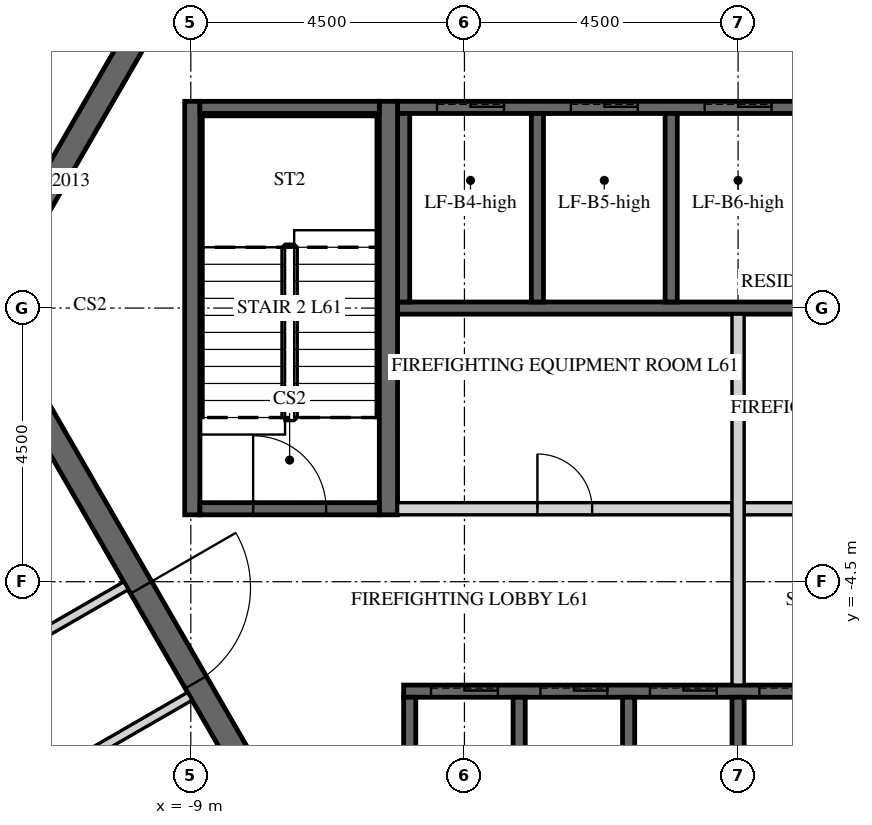
"""IFC4 building model, lengths in metres.
Left out: names, types, materials, properties, quantities, classifications, styles, units other than length and angle.
Written with IfcOpenShell. Run it as: python <this file> out.ifc"""

import sys

from ifc_helpers import new_model, si_unit, direction, frame, frame_2d, origin, place, context, subcontext, project, spatial, polyline, rectangle, outline, extrude, element, fill, save


model = new_model("IFC4")
c1 = context("Model", 3, precision=1e-05, world=origin(), true_north=direction((0.0, 1.0)))
c2 = subcontext(c1, "Body", "Model", "MODEL_VIEW")
j1 = project(units=[si_unit("LENGTHUNIT", "METRE"), si_unit("PLANEANGLEUNIT", "RADIAN")], contexts=[c1])
p1 = place(None, origin())
s1 = spatial("IfcSite", under=j1, at=p1, CompositionType="ELEMENT")
p2 = place(p1, origin())
s2 = spatial("IfcBuilding", under=s1, at=p2, CompositionType="ELEMENT")
p3 = place(p2, frame((0.0, 0.0, 256.2)))
s3 = spatial("IfcBuildingStorey", under=s2, at=p3, CompositionType="ELEMENT", Elevation=256.2)
p4 = place(p3, frame((-6.235, 10.8, 0.0), z_axis=(0.0, 0.0, 1.0), x_axis=(-0.499996419489, -0.866027470984, 0.0)))
e1 = element("IfcWall", 1, at=p4, inside=s3, PredefinedType="SHEAR", context=c2, shape_type="SweptSolid", body=[
    extrude(outline(polyline([(-0.115, -0.2), (12.586, -0.2), (12.355, 0.2), (0.115, 0.2), (-0.115, -0.2)])), origin(), (0.0, 0.0, 1.0), 3.75),
])
p5 = place(p4, frame((5.364, 0.0, 0.0)))
e2 = element("IfcOpeningElement", 2, at=p5, cuts=e1, PredefinedType="OPENING", context=c2, shape_type="SweptSolid", body=[
    extrude(rectangle(XDim=1.8, YDim=2.4, at=frame_2d((0.9, 1.2))), frame((0.0, 0.21, 0.0), z_axis=(0.0, -1.0, 0.0), x_axis=(1.0, 0.0, 0.0)), (0.0, 0.0, 1.0), 0.42),
])
p6 = place(p3, frame((-12.471, 0.0, 0.0), z_axis=(0.0, 0.0, 1.0), x_axis=(0.499996419489, -0.866027470984, 0.0)))
e3 = element("IfcWall", 3, at=p6, inside=s3, PredefinedType="SHEAR", context=c2, shape_type="SweptSolid", body=[
    extrude(outline(polyline([(-0.115, -0.2), (12.586, -0.2), (12.355, 0.2), (0.115, 0.2), (-0.115, -0.2)])), origin(), (0.0, 0.0, 1.0), 3.75),
])
p7 = place(p6, frame((5.306, 0.0, 0.0)))
e4 = element("IfcOpeningElement", 4, at=p7, cuts=e3, PredefinedType="OPENING", context=c2, shape_type="SweptSolid", body=[
    extrude(rectangle(XDim=1.8, YDim=2.4, at=frame_2d((0.9, 1.2))), frame((0.0, 0.21, 0.0), z_axis=(0.0, -1.0, 0.0), x_axis=(1.0, 0.0, 0.0)), (0.0, 0.0, 1.0), 0.42),
])
p8 = place(p3, frame((-5.6, 3.3, -0.5), z_axis=(0.0, 0.0, 1.0), x_axis=(1.0, 0.0, 0.0)))
e5 = element("IfcWall", 5, at=p8, inside=s3, PredefinedType="SHEAR", context=c2, shape_type="SweptSolid", body=[
    extrude(rectangle(XDim=6.6, YDim=0.2, at=frame_2d((3.3, 0.0))), origin(), (0.0, 0.0, 1.0), 4.15),
])
p9 = place(p8, frame((0.65, 0.0, 0.5)))
e6 = element("IfcOpeningElement", 6, at=p9, cuts=e5, PredefinedType="OPENING", context=c2, shape_type="SweptSolid", body=[
    extrude(rectangle(XDim=1.1, YDim=2.1, at=frame_2d((0.55, 1.05))), frame((0.0, 0.11, 0.0), z_axis=(0.0, -1.0, 0.0), x_axis=(1.0, 0.0, 0.0)), (0.0, 0.0, 1.0), 0.22),
])
p10 = place(p8, frame((2.85, 0.0, 0.5)))
e7 = element("IfcOpeningElement", 7, at=p10, cuts=e5, PredefinedType="OPENING", context=c2, shape_type="SweptSolid", body=[
    extrude(rectangle(XDim=1.1, YDim=2.1, at=frame_2d((0.55, 1.05))), frame((0.0, 0.11, 0.0), z_axis=(0.0, -1.0, 0.0), x_axis=(1.0, 0.0, 0.0)), (0.0, 0.0, 1.0), 0.22),
])
p11 = place(p8, frame((5.05, 0.0, 0.5)))
e8 = element("IfcOpeningElement", 8, at=p11, cuts=e5, PredefinedType="OPENING", context=c2, shape_type="SweptSolid", body=[
    extrude(rectangle(XDim=1.1, YDim=2.1, at=frame_2d((0.55, 1.05))), frame((0.0, 0.11, 0.0), z_axis=(0.0, -1.0, 0.0), x_axis=(1.0, 0.0, 0.0)), (0.0, 0.0, 1.0), 0.22),
])
p12 = place(p3, frame((-5.6, 0.0, -0.5), z_axis=(0.0, 0.0, 1.0), x_axis=(1.0, 0.0, 0.0)))
e9 = element("IfcWall", 9, at=p12, inside=s3, PredefinedType="SHEAR", context=c2, shape_type="SweptSolid", body=[
    extrude(rectangle(XDim=11.2, YDim=0.2, at=frame_2d((5.6, 0.0))), origin(), (0.0, 0.0, 1.0), 4.15),
])
for number, where, z_axis, x_axis in (
    (10, (-5.5, 0.1, -0.5), (0.0, 0.0, 1.0), (0.0, 1.0, 0.0)),
    (11, (-3.3, 0.1, -0.5), (0.0, 0.0, 1.0), (0.0, 1.0, 0.0)),
    (12, (-1.1, 0.1, -0.5), (0.0, 0.0, 1.0), (0.0, 1.0, 0.0)),
):
    element("IfcWall", number, at=place(p3, frame(where, z_axis=z_axis, x_axis=x_axis)), inside=s3, PredefinedType="SHEAR", context=c2, shape_type="SweptSolid", body=[
        extrude(rectangle(XDim=3.1, YDim=0.2, at=frame_2d((1.55, 0.0))), origin(), (0.0, 0.0, 1.0), 4.15),
    ])
p13 = place(p3, frame((-5.5, -6.3, -0.5), z_axis=(0.0, 0.0, 1.0), x_axis=(1.0, 0.0, 0.0)))
e13 = element("IfcWall", 13, at=p13, inside=s3, PredefinedType="SHEAR", context=c2, shape_type="SweptSolid", body=[
    extrude(rectangle(XDim=9.2, YDim=0.2, at=frame_2d((4.6, 0.0))), origin(), (0.0, 0.0, 1.0), 4.15),
])
p14 = place(p13, frame((0.45, 0.0, 0.5)))
e14 = element("IfcOpeningElement", 14, at=p14, cuts=e13, PredefinedType="OPENING", context=c2, shape_type="SweptSolid", body=[
    extrude(rectangle(XDim=1.1, YDim=2.1, at=frame_2d((0.55, 1.05))), frame((0.0, 0.11, 0.0), z_axis=(0.0, -1.0, 0.0), x_axis=(1.0, 0.0, 0.0)), (0.0, 0.0, 1.0), 0.22),
])
p15 = place(p13, frame((2.25, 0.0, 0.5)))
e15 = element("IfcOpeningElement", 15, at=p15, cuts=e13, PredefinedType="OPENING", context=c2, shape_type="SweptSolid", body=[
    extrude(rectangle(XDim=1.1, YDim=2.1, at=frame_2d((0.55, 1.05))), frame((0.0, 0.11, 0.0), z_axis=(0.0, -1.0, 0.0), x_axis=(1.0, 0.0, 0.0)), (0.0, 0.0, 1.0), 0.22),
])
p16 = place(p13, frame((4.05, 0.0, 0.5)))
e16 = element("IfcOpeningElement", 16, at=p16, cuts=e13, PredefinedType="OPENING", context=c2, shape_type="SweptSolid", body=[
    extrude(rectangle(XDim=1.1, YDim=2.1, at=frame_2d((0.55, 1.05))), frame((0.0, 0.11, 0.0), z_axis=(0.0, -1.0, 0.0), x_axis=(1.0, 0.0, 0.0)), (0.0, 0.0, 1.0), 0.22),
])
p17 = place(p13, frame((5.85, 0.0, 0.5)))
e17 = element("IfcOpeningElement", 17, at=p17, cuts=e13, PredefinedType="OPENING", context=c2, shape_type="SweptSolid", body=[
    extrude(rectangle(XDim=1.1, YDim=2.1, at=frame_2d((0.55, 1.05))), frame((0.0, 0.11, 0.0), z_axis=(0.0, -1.0, 0.0), x_axis=(1.0, 0.0, 0.0)), (0.0, 0.0, 1.0), 0.22),
])
p18 = place(p13, frame((7.65, 0.0, 0.5)))
e18 = element("IfcOpeningElement", 18, at=p18, cuts=e13, PredefinedType="OPENING", context=c2, shape_type="SweptSolid", body=[
    extrude(rectangle(XDim=1.1, YDim=2.1, at=frame_2d((0.55, 1.05))), frame((0.0, 0.11, 0.0), z_axis=(0.0, -1.0, 0.0), x_axis=(1.0, 0.0, 0.0)), (0.0, 0.0, 1.0), 0.22),
])
for number, where, z_axis, x_axis in (
    (19, (-5.4, -9.3, -0.5), (0.0, 0.0, 1.0), (0.0, 1.0, 0.0)),
    (20, (-3.6, -9.3, -0.5), (0.0, 0.0, 1.0), (0.0, 1.0, 0.0)),
    (21, (-1.8, -9.3, -0.5), (0.0, 0.0, 1.0), (0.0, 1.0, 0.0)),
    (22, (0.0, -9.3, -0.5), (0.0, 0.0, 1.0), (0.0, 1.0, 0.0)),
):
    element("IfcWall", number, at=place(p3, frame(where, z_axis=z_axis, x_axis=x_axis)), inside=s3, PredefinedType="SHEAR", context=c2, shape_type="SweptSolid", body=[
        extrude(rectangle(XDim=2.9, YDim=0.2, at=frame_2d((1.45, 0.0))), origin(), (0.0, 0.0, 1.0), 4.15),
    ])
p19 = place(p3, frame((-5.6, -3.3, 0.0), z_axis=(0.0, 0.0, 1.0), x_axis=(1.0, 0.0, 0.0)))
e23 = element("IfcWall", 23, at=p19, inside=s3, PredefinedType="PARTITIONING", context=c2, shape_type="SweptSolid", body=[
    extrude(rectangle(XDim=5.5, YDim=0.2, at=frame_2d((2.75, 0.0))), origin(), (0.0, 0.0, 1.0), 3.65),
])
p20 = place(p19, frame((2.3, 0.0, 0.0)))
e24 = element("IfcOpeningElement", 24, at=p20, cuts=e23, PredefinedType="OPENING", context=c2, shape_type="SweptSolid", body=[
    extrude(rectangle(XDim=0.9, YDim=2.1, at=frame_2d((0.45, 1.05))), frame((0.0, 0.11, 0.0), z_axis=(0.0, -1.0, 0.0), x_axis=(1.0, 0.0, 0.0)), (0.0, 0.0, 1.0), 0.22),
])
p21 = place(p3, frame((0.1, -3.3, 0.0), z_axis=(0.0, 0.0, 1.0), x_axis=(1.0, 0.0, 0.0)))
e25 = element("IfcWall", 25, at=p21, inside=s3, PredefinedType="PARTITIONING", context=c2, shape_type="SweptSolid", body=[
    extrude(rectangle(XDim=5.5, YDim=0.2, at=frame_2d((2.75, 0.0))), origin(), (0.0, 0.0, 1.0), 3.65),
])
p22 = place(p21, frame((2.3, 0.0, 0.0)))
e26 = element("IfcOpeningElement", 26, at=p22, cuts=e25, PredefinedType="OPENING", context=c2, shape_type="SweptSolid", body=[
    extrude(rectangle(XDim=0.9, YDim=2.1, at=frame_2d((0.45, 1.05))), frame((0.0, 0.11, 0.0), z_axis=(0.0, -1.0, 0.0), x_axis=(1.0, 0.0, 0.0)), (0.0, 0.0, 1.0), 0.22),
])
p23 = place(p3, frame((0.0, -6.2, 0.0), z_axis=(0.0, 0.0, 1.0), x_axis=(0.0, 1.0, 0.0)))
e27 = element("IfcWall", 27, at=p23, inside=s3, PredefinedType="PARTITIONING", context=c2, shape_type="SweptSolid", body=[
    extrude(rectangle(XDim=6.1, YDim=0.2, at=frame_2d((3.05, 0.0))), origin(), (0.0, 0.0, 1.0), 3.65),
])
p24 = place(p3, frame((-5.75, -3.4, -0.5), z_axis=(0.0, 0.0, 1.0), x_axis=(0.0, 1.0, 0.0)))
e28 = element("IfcWall", 28, at=p24, inside=s3, PredefinedType="SHEAR", context=c2, shape_type="SweptSolid", body=[
    extrude(rectangle(XDim=6.8, YDim=0.3, at=frame_2d((3.4, 0.0))), origin(), (0.0, 0.0, 1.0), 4.15),
])
p25 = place(p3, frame((-8.975, -3.4, -0.5), z_axis=(0.0, 0.0, 1.0), x_axis=(0.0, 1.0, 0.0)))
e29 = element("IfcWall", 29, at=p25, inside=s3, PredefinedType="SHEAR", context=c2, shape_type="SweptSolid", body=[
    extrude(rectangle(XDim=6.8, YDim=0.25, at=frame_2d((3.4, 0.0))), origin(), (0.0, 0.0, 1.0), 4.15),
])
p26 = place(p3, frame((-8.85, 3.3, -0.5), z_axis=(0.0, 0.0, 1.0), x_axis=(1.0, 0.0, 0.0)))
e30 = element("IfcWall", 30, at=p26, inside=s3, PredefinedType="SHEAR", context=c2, shape_type="SweptSolid", body=[
    extrude(rectangle(XDim=2.95, YDim=0.2, at=frame_2d((1.475, 0.0))), origin(), (0.0, 0.0, 1.0), 4.15),
])
p27 = place(p3, frame((-8.85, -3.3, -0.5), z_axis=(0.0, 0.0, 1.0), x_axis=(1.0, 0.0, 0.0)))
e31 = element("IfcWall", 31, at=p27, inside=s3, PredefinedType="SHEAR", context=c2, shape_type="SweptSolid", body=[
    extrude(rectangle(XDim=2.95, YDim=0.2, at=frame_2d((1.475, 0.0))), origin(), (0.0, 0.0, 1.0), 4.15),
])
p28 = place(p27, frame((0.875, 0.0, 0.5)))
e32 = element("IfcOpeningElement", 32, at=p28, cuts=e31, PredefinedType="OPENING", context=c2, shape_type="SweptSolid", body=[
    extrude(rectangle(XDim=1.2, YDim=2.4, at=frame_2d((0.6, 1.2))), frame((0.0, 0.11, 0.0), z_axis=(0.0, -1.0, 0.0), x_axis=(1.0, 0.0, 0.0)), (0.0, 0.0, 1.0), 0.22),
])
p29 = place(p3, frame((-8.622, 17.225, 0.0), z_axis=(0.0, 0.0, 1.0), x_axis=(-0.438366544921, -0.898796290765, 0.0)))
e33 = element("IfcWall", 33, at=p29, inside=s3, PredefinedType="PARTITIONING", context=c2, shape_type="SweptSolid", body=[
    extrude(rectangle(XDim=17.273, YDim=0.15, at=frame_2d((8.637, 0.0))), origin(), (0.0, 0.0, 1.0), 2.823),
])
p30 = place(p29, frame((6.478, 0.0, 0.0)))
e34 = element("IfcOpeningElement", 34, at=p30, cuts=e33, PredefinedType="OPENING", context=c2, shape_type="SweptSolid", body=[
    extrude(rectangle(XDim=1.0, YDim=2.1, at=frame_2d((0.5, 1.05))), frame((0.0, 0.085, 0.0), z_axis=(0.0, -1.0, 0.0), x_axis=(1.0, 0.0, 0.0)), (0.0, 0.0, 1.0), 0.17),
])
p31 = place(p3, frame((-18.338, -2.838, 0.0), z_axis=(0.0, 0.0, 1.0), x_axis=(0.499999693481, -0.866025580753, 0.0)))
e35 = element("IfcWall", 35, at=p31, inside=s3, PredefinedType="PARTITIONING", context=c2, shape_type="SweptSolid", body=[
    extrude(rectangle(XDim=15.296, YDim=0.15, at=frame_2d((7.648, 0.0))), origin(), (0.0, 0.0, 1.0), 2.823),
])
p32 = place(p31, frame((2.925, 0.0, 0.0)))
e36 = element("IfcOpeningElement", 36, at=p32, cuts=e35, PredefinedType="OPENING", context=c2, shape_type="SweptSolid", body=[
    extrude(rectangle(XDim=1.0, YDim=2.1, at=frame_2d((0.5, 1.05))), frame((0.0, 0.085, 0.0), z_axis=(0.0, -1.0, 0.0), x_axis=(1.0, 0.0, 0.0)), (0.0, 0.0, 1.0), 0.17),
])
p33 = place(p31, frame((14.136, 0.0, 0.0)))
e37 = element("IfcOpeningElement", 37, at=p33, cuts=e35, PredefinedType="OPENING", context=c2, shape_type="SweptSolid", body=[
    extrude(rectangle(XDim=1.0, YDim=2.1, at=frame_2d((0.5, 1.05))), frame((0.0, 0.085, 0.0), z_axis=(0.0, -1.0, 0.0), x_axis=(1.0, 0.0, 0.0)), (0.0, 0.0, 1.0), 0.17),
])
p34 = place(p3, frame((-10.066, -4.566, 0.0), z_axis=(0.0, 0.0, 1.0), x_axis=(-0.866037363387, -0.499979284789, 0.0)))
e38 = element("IfcWall", 38, at=p34, inside=s3, PredefinedType="PARTITIONING", context=c2, shape_type="SweptSolid", body=[
    extrude(rectangle(XDim=4.8, YDim=0.15, at=frame_2d((2.4, 0.0))), origin(), (0.0, 0.0, 1.0), 2.823),
])
p35 = place(p3, frame((-13.108, -8.747, 0.0), z_axis=(0.0, 0.0, 1.0), x_axis=(0.866024684746, 0.500001245408, 0.0)))
e39 = element("IfcWall", 39, at=p35, inside=s3, PredefinedType="PARTITIONING", context=c2, shape_type="SweptSolid", body=[
    extrude(rectangle(XDim=4.725, YDim=0.15, at=frame_2d((2.363, 0.0))), origin(), (0.0, 0.0, 1.0), 2.823),
])
p36 = place(p7, origin())
e40 = element("IfcDoor", 40, at=p36, inside=s3, OperationType="DOUBLE_DOOR_SINGLE_SWING", PredefinedType="DOOR", context=c2, shape_type="SweptSolid", body=[
    extrude(rectangle(XDim=1.8, YDim=2.4, at=frame_2d((0.9, 1.2))), frame((0.0, 0.025, 0.0), z_axis=(0.0, -1.0, 0.0), x_axis=(1.0, 0.0, 0.0)), (0.0, 0.0, 1.0), 0.05),
])
fill(e4, e40)
p37 = place(p20, origin())
e41 = element("IfcDoor", 41, at=p37, inside=s3, OperationType="SINGLE_SWING_LEFT", PredefinedType="DOOR", context=c2, shape_type="SweptSolid", body=[
    extrude(rectangle(XDim=0.9, YDim=2.1, at=frame_2d((0.45, 1.05))), frame((0.0, 0.025, 0.0), z_axis=(0.0, -1.0, 0.0), x_axis=(1.0, 0.0, 0.0)), (0.0, 0.0, 1.0), 0.05),
])
fill(e24, e41)
p38 = place(p28, origin())
e42 = element("IfcDoor", 42, at=p38, inside=s3, OperationType="SINGLE_SWING_LEFT", PredefinedType="DOOR", context=c2, shape_type="SweptSolid", body=[
    extrude(rectangle(XDim=1.2, YDim=2.4, at=frame_2d((0.6, 1.2))), frame((0.0, 0.025, 0.0), z_axis=(0.0, -1.0, 0.0), x_axis=(1.0, 0.0, 0.0)), (0.0, 0.0, 1.0), 0.05),
])
fill(e32, e42)
p39 = place(p9, origin())
e43 = element("IfcDoor", 43, at=p39, inside=s3, OperationType="SLIDING_TO_LEFT", PredefinedType="DOOR", context=c2, shape_type="SweptSolid", body=[
    extrude(rectangle(XDim=1.1, YDim=2.1, at=frame_2d((0.55, 1.05))), frame((0.0, 0.025, 0.0), z_axis=(0.0, -1.0, 0.0), x_axis=(1.0, 0.0, 0.0)), (0.0, 0.0, 1.0), 0.05),
])
fill(e6, e43)
p40 = place(p10, origin())
e44 = element("IfcDoor", 44, at=p40, inside=s3, OperationType="SLIDING_TO_LEFT", PredefinedType="DOOR", context=c2, shape_type="SweptSolid", body=[
    extrude(rectangle(XDim=1.1, YDim=2.1, at=frame_2d((0.55, 1.05))), frame((0.0, 0.025, 0.0), z_axis=(0.0, -1.0, 0.0), x_axis=(1.0, 0.0, 0.0)), (0.0, 0.0, 1.0), 0.05),
])
fill(e7, e44)
p41 = place(p11, origin())
e45 = element("IfcDoor", 45, at=p41, inside=s3, OperationType="SLIDING_TO_LEFT", PredefinedType="DOOR", context=c2, shape_type="SweptSolid", body=[
    extrude(rectangle(XDim=1.1, YDim=2.1, at=frame_2d((0.55, 1.05))), frame((0.0, 0.025, 0.0), z_axis=(0.0, -1.0, 0.0), x_axis=(1.0, 0.0, 0.0)), (0.0, 0.0, 1.0), 0.05),
])
fill(e8, e45)
p42 = place(p14, origin())
e46 = element("IfcDoor", 46, at=p42, inside=s3, OperationType="SLIDING_TO_LEFT", PredefinedType="DOOR", context=c2, shape_type="SweptSolid", body=[
    extrude(rectangle(XDim=1.1, YDim=2.1, at=frame_2d((0.55, 1.05))), frame((0.0, 0.025, 0.0), z_axis=(0.0, -1.0, 0.0), x_axis=(1.0, 0.0, 0.0)), (0.0, 0.0, 1.0), 0.05),
])
fill(e14, e46)
p43 = place(p15, origin())
e47 = element("IfcDoor", 47, at=p43, inside=s3, OperationType="SLIDING_TO_LEFT", PredefinedType="DOOR", context=c2, shape_type="SweptSolid", body=[
    extrude(rectangle(XDim=1.1, YDim=2.1, at=frame_2d((0.55, 1.05))), frame((0.0, 0.025, 0.0), z_axis=(0.0, -1.0, 0.0), x_axis=(1.0, 0.0, 0.0)), (0.0, 0.0, 1.0), 0.05),
])
fill(e15, e47)
p44 = place(p16, origin())
e48 = element("IfcDoor", 48, at=p44, inside=s3, OperationType="SLIDING_TO_LEFT", PredefinedType="DOOR", context=c2, shape_type="SweptSolid", body=[
    extrude(rectangle(XDim=1.1, YDim=2.1, at=frame_2d((0.55, 1.05))), frame((0.0, 0.025, 0.0), z_axis=(0.0, -1.0, 0.0), x_axis=(1.0, 0.0, 0.0)), (0.0, 0.0, 1.0), 0.05),
])
fill(e16, e48)
p45 = place(p17, origin())
e49 = element("IfcDoor", 49, at=p45, inside=s3, OperationType="SLIDING_TO_LEFT", PredefinedType="DOOR", context=c2, shape_type="SweptSolid", body=[
    extrude(rectangle(XDim=1.1, YDim=2.1, at=frame_2d((0.55, 1.05))), frame((0.0, 0.025, 0.0), z_axis=(0.0, -1.0, 0.0), x_axis=(1.0, 0.0, 0.0)), (0.0, 0.0, 1.0), 0.05),
])
fill(e17, e49)
save(model, sys.argv[1])
